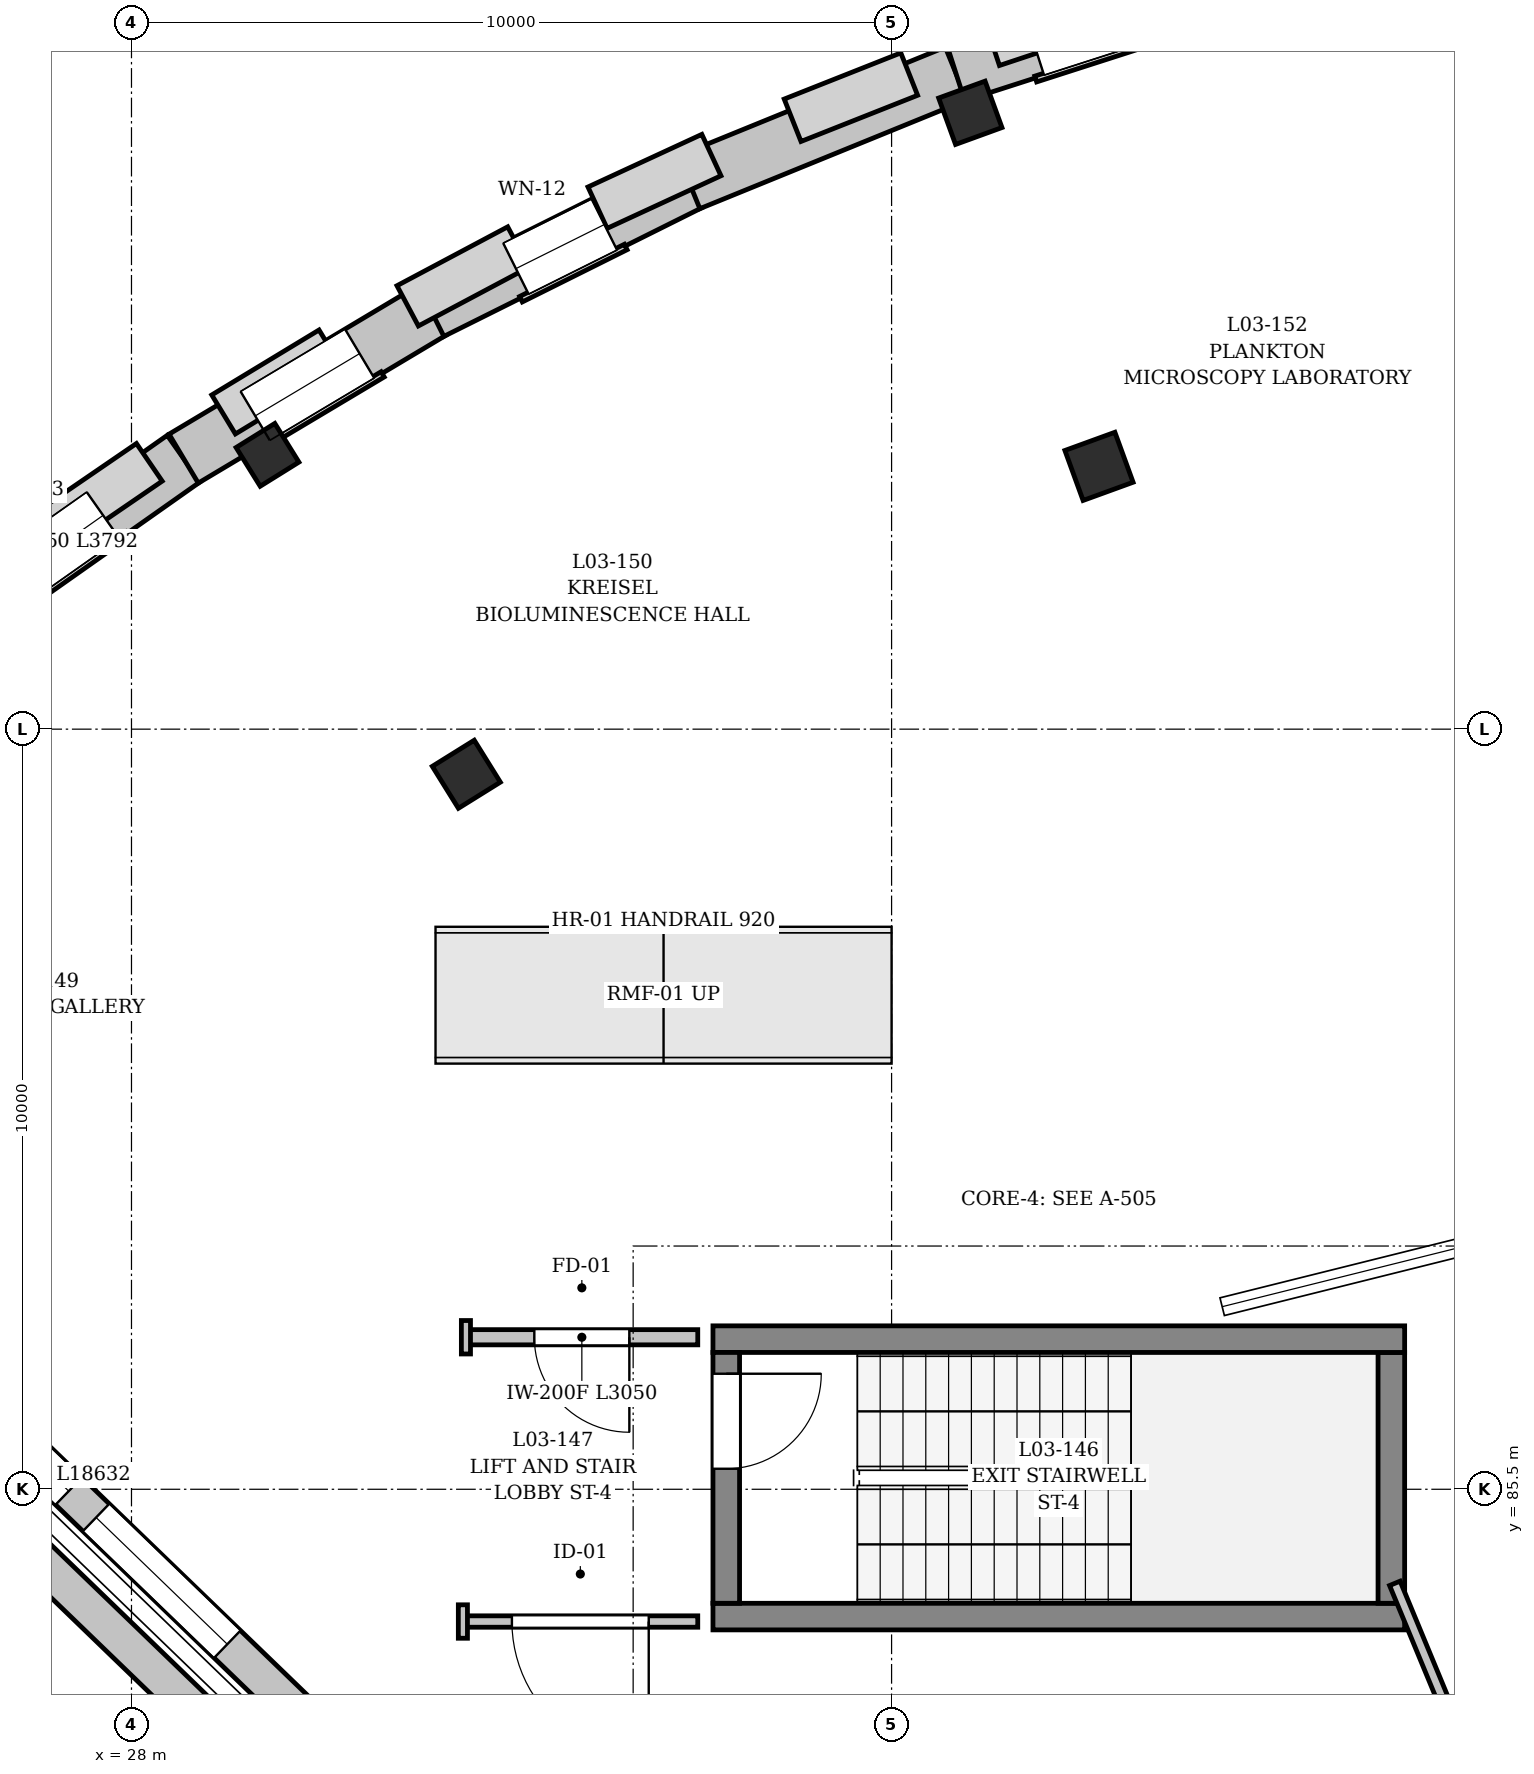
"""IFC4 building model, lengths in metres.
Left out: names, types, materials, properties, quantities, classifications, styles, units other than length and angle.
Written with IfcOpenShell. Run it as: python <this file> out.ifc"""

import sys

from ifc_helpers import new_model, si_unit, direction, frame, frame_2d, origin, origin_2d, place, context, subcontext, project, spatial, rectangle, extrude, element, fill, save


model = new_model("IFC4")
c1 = context("Model", 3, precision=1e-05, world=origin(), true_north=direction((0.0, 1.0)))
c2 = subcontext(c1, "Body", "Model", "MODEL_VIEW")
j1 = project(units=[si_unit("LENGTHUNIT", "METRE"), si_unit("PLANEANGLEUNIT", "RADIAN")], contexts=[c1])
p1 = place(None, origin())
s1 = spatial("IfcSite", under=j1, at=p1, CompositionType="ELEMENT")
p2 = place(p1, origin())
s2 = spatial("IfcBuilding", under=s1, at=p2, CompositionType="ELEMENT")
p3 = place(p2, frame((0.0, 0.0, 10.2)))
s3 = spatial("IfcBuildingStorey", under=s2, at=p3, CompositionType="ELEMENT", Elevation=10.2)
p4 = place(p3, frame((40.729, 98.957, 0.0), z_axis=(0.0, 0.0, 1.0), x_axis=(-0.342020143326, 0.939692620786, 0.0)))
e1 = element("IfcColumn", 1, at=p4, inside=s3, PredefinedType="COLUMN", context=c2, shape_type="SweptSolid", body=[
    extrude(rectangle(XDim=0.7, YDim=0.7, at=origin_2d()), origin(), (0.0, 0.0, 1.0), 4.52),
])
for number, where, z_axis, x_axis in (
    (2, (39.036, 103.609, 0.0), (0.0, 0.0, 1.0), (-0.342, 0.94, 0.0)),
    (3, (32.405, 94.906, 0.0), (0.0, 0.0, 1.0), (-0.528, 0.849, 0.0)),
):
    element("IfcColumn", number, at=place(p3, frame(where, z_axis=z_axis, x_axis=x_axis)), inside=s3, PredefinedType="COLUMN", context=c2, shape_type="SweptSolid", body=[
        extrude(rectangle(XDim=0.65, YDim=0.65, at=origin_2d()), origin(), (0.0, 0.0, 1.0), 4.52),
    ])
p5 = place(p3, frame((29.79, 99.109, 0.0), z_axis=(0.0, 0.0, 1.0), x_axis=(-0.528438334722, 0.848971687629, 0.0)))
e4 = element("IfcColumn", 4, at=p5, inside=s3, PredefinedType="COLUMN", context=c2, shape_type="SweptSolid", body=[
    extrude(rectangle(XDim=0.6, YDim=0.6, at=origin_2d()), origin(), (0.0, 0.0, 1.0), 4.52),
])
p6 = place(p3, frame((24.619, 86.665, 0.0), z_axis=(0.0, 0.0, 1.0), x_axis=(0.719355518734, -0.694642093215, 0.0)))
e5 = element("IfcWall", 5, at=p6, inside=s3, PredefinedType="SOLIDWALL", context=c2, shape_type="SweptSolid", body=[
    extrude(rectangle(XDim=7.142, YDim=0.5, at=frame_2d((3.571, 0.0))), origin(), (0.0, 0.0, 1.0), 7.16),
])
p7 = place(p3, frame((33.66, 79.213, 0.0), z_axis=(0.0, 0.0, 1.0), x_axis=(-0.719335980864, 0.694662325619, 0.0)))
e6 = element("IfcWall", 6, at=p7, inside=s3, PredefinedType="SOLIDWALL", context=c2, shape_type="SweptSolid", body=[
    extrude(rectangle(XDim=18.632, YDim=0.5, at=frame_2d((9.316, 0.0))), origin(), (0.0, 0.0, 1.0), 4.52),
])
p8 = place(p7, frame((2.116, 0.0, 0.9)))
e7 = element("IfcOpeningElement", 7, at=p8, cuts=e6, PredefinedType="OPENING", context=c2, shape_type="SweptSolid", body=[
    extrude(rectangle(XDim=2.4, YDim=1.1, at=frame_2d((1.2, 0.55))), frame((0.0, 0.26, 0.0), z_axis=(0.0, -1.0, 0.0), x_axis=(1.0, 0.0, 0.0)), (0.0, 0.0, 1.0), 0.52),
])
p9 = place(p7, frame((6.116, 0.0, 0.9)))
e8 = element("IfcOpeningElement", 8, at=p9, cuts=e6, PredefinedType="OPENING", context=c2, shape_type="SweptSolid", body=[
    extrude(rectangle(XDim=2.4, YDim=1.1, at=frame_2d((1.2, 0.55))), frame((0.0, 0.26, 0.0), z_axis=(0.0, -1.0, 0.0), x_axis=(1.0, 0.0, 0.0)), (0.0, 0.0, 1.0), 0.52),
])
p10 = place(p7, frame((9.016, 0.0, 0.9)))
e9 = element("IfcOpeningElement", 9, at=p10, cuts=e6, PredefinedType="OPENING", context=c2, shape_type="SweptSolid", body=[
    extrude(rectangle(XDim=2.4, YDim=1.1, at=frame_2d((1.2, 0.55))), frame((0.0, 0.26, 0.0), z_axis=(0.0, -1.0, 0.0), x_axis=(1.0, 0.0, 0.0)), (0.0, 0.0, 1.0), 0.52),
])
p11 = place(p7, frame((13.336, 0.0, 0.9)))
e10 = element("IfcOpeningElement", 10, at=p11, cuts=e6, PredefinedType="OPENING", context=c2, shape_type="SweptSolid", body=[
    extrude(rectangle(XDim=2.4, YDim=1.1, at=frame_2d((1.2, 0.55))), frame((0.0, 0.26, 0.0), z_axis=(0.0, -1.0, 0.0), x_axis=(1.0, 0.0, 0.0)), (0.0, 0.0, 1.0), 0.52),
])
p12 = place(p3, frame((25.587, 96.875, 0.0), z_axis=(0.0, 0.0, 1.0), x_axis=(0.817470720904, 0.57597015588, 0.0)))
e11 = element("IfcWall", 11, at=p12, inside=s3, PredefinedType="SOLIDWALL", context=c2, shape_type="SweptSolid", body=[
    extrude(rectangle(XDim=3.792, YDim=0.75, at=frame_2d((1.896, 0.0))), origin(), (0.0, 0.0, 1.0), 4.52),
])
p13 = place(p12, frame((1.296, 0.0, 0.75)))
e12 = element("IfcOpeningElement", 12, at=p13, cuts=e11, PredefinedType="OPENING", context=c2, shape_type="SweptSolid", body=[
    extrude(rectangle(XDim=1.2, YDim=2.2, at=frame_2d((0.6, 1.1))), frame((0.0, 0.385, 0.0), z_axis=(0.0, -1.0, 0.0), x_axis=(1.0, 0.0, 0.0)), (0.0, 0.0, 1.0), 0.77),
])
p14 = place(p3, frame((28.687, 99.059, 0.0), z_axis=(0.0, 0.0, 1.0), x_axis=(0.858644028079, 0.512572368592, 0.0)))
e13 = element("IfcWall", 13, at=p14, inside=s3, PredefinedType="SOLIDWALL", context=c2, shape_type="SweptSolid", body=[
    extrude(rectangle(XDim=3.792, YDim=0.75, at=frame_2d((1.896, 0.0))), origin(), (0.0, 0.0, 1.0), 3.11),
])
p15 = place(p14, frame((1.096, 0.0, 0.75)))
e14 = element("IfcOpeningElement", 14, at=p15, cuts=e13, PredefinedType="OPENING", context=c2, shape_type="SweptSolid", body=[
    extrude(rectangle(XDim=1.6, YDim=1.6, at=frame_2d((0.8, 0.8))), frame((0.0, 0.385, 0.0), z_axis=(0.0, -1.0, 0.0), x_axis=(1.0, 0.0, 0.0)), (0.0, 0.0, 1.0), 0.77),
])
p16 = place(p3, frame((31.942, 101.003, 0.0), z_axis=(0.0, 0.0, 1.0), x_axis=(0.89495448859, 0.446157442337, 0.0)))
e15 = element("IfcWall", 15, at=p16, inside=s3, PredefinedType="SOLIDWALL", context=c2, shape_type="SweptSolid", body=[
    extrude(rectangle(XDim=3.792, YDim=0.75, at=frame_2d((1.896, 0.0))), origin(), (0.0, 0.0, 1.0), 4.52),
])
p17 = place(p16, frame((1.246, 0.0, 0.75)))
e16 = element("IfcOpeningElement", 16, at=p17, cuts=e15, PredefinedType="OPENING", context=c2, shape_type="SweptSolid", body=[
    extrude(rectangle(XDim=1.3, YDim=2.2, at=frame_2d((0.65, 1.1))), frame((0.0, 0.385, 0.0), z_axis=(0.0, -1.0, 0.0), x_axis=(1.0, 0.0, 0.0)), (0.0, 0.0, 1.0), 0.77),
])
p18 = place(p3, frame((35.336, 102.695, 0.0), z_axis=(0.0, 0.0, 1.0), x_axis=(0.92607319541, 0.377343923686, 0.0)))
e17 = element("IfcWall", 17, at=p18, inside=s3, PredefinedType="SOLIDWALL", context=c2, shape_type="SweptSolid", body=[
    extrude(rectangle(XDim=3.792, YDim=0.75, at=frame_2d((1.896, 0.0))), origin(), (0.0, 0.0, 1.0), 3.11),
])
p19 = place(p3, frame((38.848, 104.125, 0.0), z_axis=(0.0, 0.0, 1.0), x_axis=(0.951959535224, 0.306223845081, 0.0)))
e18 = element("IfcWall", 18, at=p19, inside=s3, PredefinedType="SOLIDWALL", context=c2, shape_type="SweptSolid", body=[
    extrude(rectangle(XDim=3.792, YDim=0.75, at=frame_2d((1.896, 0.0))), origin(), (0.0, 0.0, 1.0), 3.11),
])
p20 = place(p19, frame((1.096, 0.0, 0.75)))
e19 = element("IfcOpeningElement", 19, at=p20, cuts=e18, PredefinedType="OPENING", context=c2, shape_type="SweptSolid", body=[
    extrude(rectangle(XDim=1.6, YDim=1.6, at=frame_2d((0.8, 0.8))), frame((0.0, 0.385, 0.0), z_axis=(0.0, -1.0, 0.0), x_axis=(1.0, 0.0, 0.0)), (0.0, 0.0, 1.0), 0.77),
])
p21 = place(p3, frame((35.65, 83.825, 0.0), z_axis=(0.0, 0.0, 1.0), x_axis=(1.0, 0.0, 0.0)))
e20 = element("IfcWall", 20, at=p21, inside=s3, PredefinedType="SHEAR", context=c2, shape_type="SweptSolid", body=[
    extrude(rectangle(XDim=9.1, YDim=0.35, at=frame_2d((4.55, 0.0))), origin(), (0.0, 0.0, 1.0), 4.52),
])
p22 = place(p3, frame((44.575, 84.0, 0.0), z_axis=(0.0, 0.0, 1.0), x_axis=(0.0, 1.0, 0.0)))
e21 = element("IfcWall", 21, at=p22, inside=s3, PredefinedType="SHEAR", context=c2, shape_type="SweptSolid", body=[
    extrude(rectangle(XDim=3.3, YDim=0.35, at=frame_2d((1.65, 0.0))), origin(), (0.0, 0.0, 1.0), 4.52),
])
p23 = place(p3, frame((44.75, 87.475, 0.0), z_axis=(0.0, 0.0, 1.0), x_axis=(-1.0, 0.0, 0.0)))
e22 = element("IfcWall", 22, at=p23, inside=s3, PredefinedType="SHEAR", context=c2, shape_type="SweptSolid", body=[
    extrude(rectangle(XDim=9.1, YDim=0.35, at=frame_2d((4.55, 0.0))), origin(), (0.0, 0.0, 1.0), 4.52),
])
p24 = place(p3, frame((35.825, 87.3, 0.0), z_axis=(0.0, 0.0, 1.0), x_axis=(0.0, -1.0, 0.0)))
e23 = element("IfcWall", 23, at=p24, inside=s3, PredefinedType="SHEAR", context=c2, shape_type="SweptSolid", body=[
    extrude(rectangle(XDim=3.3, YDim=0.35, at=frame_2d((1.65, 0.0))), origin(), (0.0, 0.0, 1.0), 4.52),
])
p25 = place(p24, frame((0.28, 0.0, 0.0)))
e24 = element("IfcOpeningElement", 24, at=p25, cuts=e23, PredefinedType="OPENING", context=c2, shape_type="SweptSolid", body=[
    extrude(rectangle(XDim=1.25, YDim=2.2, at=frame_2d((0.625, 1.1))), frame((0.0, 0.185, 0.0), z_axis=(0.0, -1.0, 0.0), x_axis=(1.0, 0.0, 0.0)), (0.0, 0.0, 1.0), 0.37),
])
p26 = place(p3, frame((35.45, 87.5, 0.0), z_axis=(0.0, 0.0, 1.0), x_axis=(-1.0, 0.0, 0.0)))
e25 = element("IfcWall", 25, at=p26, inside=s3, PredefinedType="PARTITIONING", context=c2, shape_type="SweptSolid", body=[
    extrude(rectangle(XDim=3.05, YDim=0.2, at=frame_2d((1.525, 0.0))), origin(), (0.0, 0.0, 1.0), 3.11),
])
p27 = place(p26, frame((0.9, 0.0, 0.0)))
e26 = element("IfcOpeningElement", 26, at=p27, cuts=e25, PredefinedType="OPENING", context=c2, shape_type="SweptSolid", body=[
    extrude(rectangle(XDim=1.25, YDim=2.2, at=frame_2d((0.625, 1.1))), frame((0.0, 0.11, 0.0), z_axis=(0.0, -1.0, 0.0), x_axis=(1.0, 0.0, 0.0)), (0.0, 0.0, 1.0), 0.22),
])
p28 = place(p3, frame((35.45, 83.76, 0.0), z_axis=(0.0, 0.0, 1.0), x_axis=(-1.0, 0.0, 0.0)))
e27 = element("IfcWall", 27, at=p28, inside=s3, PredefinedType="PARTITIONING", context=c2, shape_type="SweptSolid", body=[
    extrude(rectangle(XDim=3.09, YDim=0.15, at=frame_2d((1.545, 0.0))), origin(), (0.0, 0.0, 1.0), 3.83),
])
p29 = place(p28, frame((0.645, 0.0, 0.0)))
e28 = element("IfcOpeningElement", 28, at=p29, cuts=e27, PredefinedType="OPENING", context=c2, shape_type="SweptSolid", body=[
    extrude(rectangle(XDim=1.8, YDim=2.4, at=frame_2d((0.9, 1.2))), frame((0.0, 0.085, 0.0), z_axis=(0.0, -1.0, 0.0), x_axis=(1.0, 0.0, 0.0)), (0.0, 0.0, 1.0), 0.17),
])
p30 = place(p3, frame((47.322, 77.742, 0.0), z_axis=(0.0, 0.0, 1.0), x_axis=(-0.382701100873, 0.923872213778, 0.0)))
e29 = element("IfcWall", 29, at=p30, inside=s3, PredefinedType="PARTITIONING", context=c2, shape_type="SweptSolid", body=[
    extrude(rectangle(XDim=7.058, YDim=0.15, at=frame_2d((3.529, 0.0))), origin(), (0.0, 0.0, 1.0), 3.91),
])
p31 = place(p30, frame((2.624, 0.0, 0.0)))
e30 = element("IfcOpeningElement", 30, at=p31, cuts=e29, PredefinedType="OPENING", context=c2, shape_type="SweptSolid", body=[
    extrude(rectangle(XDim=0.95, YDim=2.2, at=frame_2d((0.475, 1.1))), frame((0.0, 0.085, 0.0), z_axis=(0.0, -1.0, 0.0), x_axis=(1.0, 0.0, 0.0)), (0.0, 0.0, 1.0), 0.17),
])
p32 = place(p3, frame((32.4, 87.72, 0.0), z_axis=(0.0, 0.0, 1.0), x_axis=(0.0, -1.0, 0.0)))
e31 = element("IfcWall", 31, at=p32, inside=s3, PredefinedType="PARTITIONING", context=c2, shape_type="SweptSolid", body=[
    extrude(rectangle(XDim=0.44, YDim=0.12, at=frame_2d((0.22, 0.0))), origin(), (0.0, 0.0, 1.0), 4.52),
])
p33 = place(p3, frame((32.36, 83.98, 0.0), z_axis=(0.0, 0.0, 1.0), x_axis=(0.0, -1.0, 0.0)))
e32 = element("IfcWall", 32, at=p33, inside=s3, PredefinedType="PARTITIONING", context=c2, shape_type="SweptSolid", body=[
    extrude(rectangle(XDim=0.44, YDim=0.12, at=frame_2d((0.22, 0.0))), origin(), (0.0, 0.0, 1.0), 3.83),
])
p34 = place(p9, origin())
e33 = element("IfcWindow", 33, at=p34, inside=s3, PartitioningType="DOUBLE_PANEL_HORIZONTAL", PredefinedType="LIGHTDOME", context=c2, shape_type="SweptSolid", body=[
    extrude(rectangle(XDim=2.4, YDim=1.1, at=frame_2d((1.2, 0.55))), frame((0.0, 0.03, 0.0), z_axis=(0.0, -1.0, 0.0), x_axis=(1.0, 0.0, 0.0)), (0.0, 0.0, 1.0), 0.06),
])
fill(e8, e33)
p35 = place(p10, origin())
e34 = element("IfcWindow", 34, at=p35, inside=s3, PartitioningType="DOUBLE_PANEL_HORIZONTAL", PredefinedType="LIGHTDOME", context=c2, shape_type="SweptSolid", body=[
    extrude(rectangle(XDim=2.4, YDim=1.1, at=frame_2d((1.2, 0.55))), frame((0.0, 0.03, 0.0), z_axis=(0.0, -1.0, 0.0), x_axis=(1.0, 0.0, 0.0)), (0.0, 0.0, 1.0), 0.06),
])
fill(e9, e34)
p36 = place(p13, origin())
e35 = element("IfcWindow", 35, at=p36, inside=s3, PartitioningType="DOUBLE_PANEL_VERTICAL", PredefinedType="WINDOW", context=c2, shape_type="SweptSolid", body=[
    extrude(rectangle(XDim=1.2, YDim=2.2, at=frame_2d((0.6, 1.1))), frame((0.0, 0.03, 0.0), z_axis=(0.0, -1.0, 0.0), x_axis=(1.0, 0.0, 0.0)), (0.0, 0.0, 1.0), 0.06),
])
fill(e12, e35)
p37 = place(p15, origin())
e36 = element("IfcWindow", 36, at=p37, inside=s3, PartitioningType="DOUBLE_PANEL_VERTICAL", PredefinedType="WINDOW", context=c2, shape_type="SweptSolid", body=[
    extrude(rectangle(XDim=1.6, YDim=1.6, at=frame_2d((0.8, 0.8))), frame((0.0, 0.03, 0.0), z_axis=(0.0, -1.0, 0.0), x_axis=(1.0, 0.0, 0.0)), (0.0, 0.0, 1.0), 0.06),
])
fill(e14, e36)
p38 = place(p17, origin())
e37 = element("IfcWindow", 37, at=p38, inside=s3, PartitioningType="DOUBLE_PANEL_VERTICAL", PredefinedType="WINDOW", context=c2, shape_type="SweptSolid", body=[
    extrude(rectangle(XDim=1.3, YDim=2.2, at=frame_2d((0.65, 1.1))), frame((0.0, 0.03, 0.0), z_axis=(0.0, -1.0, 0.0), x_axis=(1.0, 0.0, 0.0)), (0.0, 0.0, 1.0), 0.06),
])
fill(e16, e37)
p39 = place(p25, origin())
e38 = element("IfcDoor", 38, at=p39, inside=s3, OperationType="SINGLE_SWING_RIGHT", PredefinedType="DOOR", context=c2, shape_type="SweptSolid", body=[
    extrude(rectangle(XDim=1.25, YDim=2.2, at=frame_2d((0.625, 1.1))), frame((0.0, 0.025, 0.0), z_axis=(0.0, -1.0, 0.0), x_axis=(1.0, 0.0, 0.0)), (0.0, 0.0, 1.0), 0.05),
])
fill(e24, e38)
p40 = place(p27, origin())
e39 = element("IfcDoor", 39, at=p40, inside=s3, OperationType="SINGLE_SWING_LEFT", PredefinedType="DOOR", context=c2, shape_type="SweptSolid", body=[
    extrude(rectangle(XDim=1.25, YDim=2.2, at=frame_2d((0.625, 1.1))), frame((0.0, 0.025, 0.0), z_axis=(0.0, -1.0, 0.0), x_axis=(1.0, 0.0, 0.0)), (0.0, 0.0, 1.0), 0.05),
])
fill(e26, e39)
p41 = place(p29, origin())
e40 = element("IfcDoor", 40, at=p41, inside=s3, OperationType="DOUBLE_DOOR_SINGLE_SWING", PredefinedType="DOOR", context=c2, shape_type="SweptSolid", body=[
    extrude(rectangle(XDim=1.8, YDim=2.4, at=frame_2d((0.9, 1.2))), frame((0.0, 0.025, 0.0), z_axis=(0.0, -1.0, 0.0), x_axis=(1.0, 0.0, 0.0)), (0.0, 0.0, 1.0), 0.05),
])
fill(e28, e40)
save(model, sys.argv[1])
